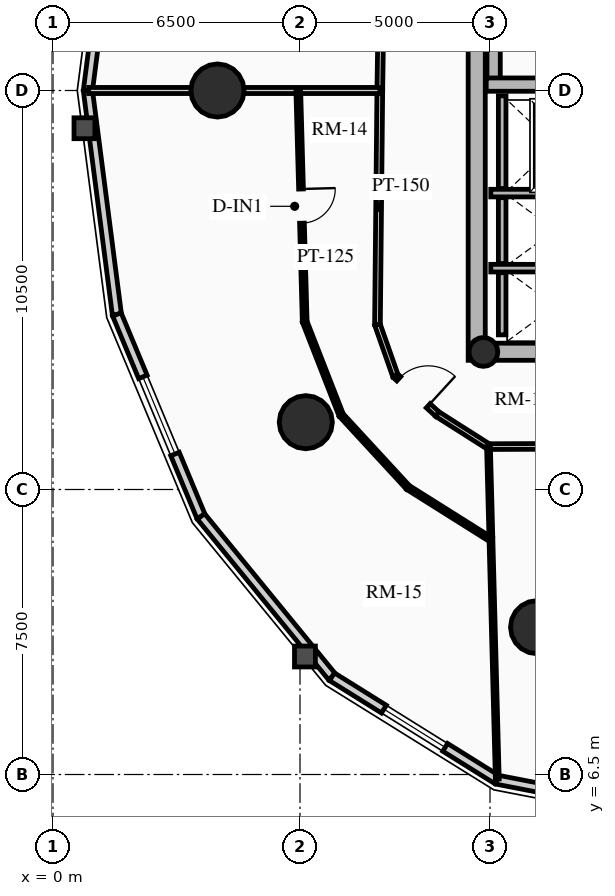
"""IFC4 building model, lengths in metres.
Left out: names, types, materials, properties, quantities, classifications, styles, units other than length and angle.
Written with IfcOpenShell. Run it as: python <this file> out.ifc"""

import sys

from ifc_helpers import new_model, si_unit, direction, frame, frame_2d, origin, origin_2d, place, context, subcontext, project, spatial, rectangle, circle, hollow_circle, extrude, source, transform, mapped, element, fill, save


model = new_model("IFC4")
c1 = context("Model", 3, precision=1e-05, world=origin(), true_north=direction((0.0, 1.0)))
c2 = subcontext(c1, "Body", "Model", "MODEL_VIEW")
j1 = project(units=[si_unit("LENGTHUNIT", "METRE"), si_unit("PLANEANGLEUNIT", "RADIAN")], contexts=[c1])
p1 = place(None, origin())
s1 = spatial("IfcSite", under=j1, at=p1, CompositionType="ELEMENT")
p2 = place(p1, origin())
s2 = spatial("IfcBuilding", under=s1, at=p2, CompositionType="ELEMENT")
p3 = place(p2, frame((0.0, 0.0, 125.44)))
s3 = spatial("IfcBuildingStorey", under=s2, at=p3, CompositionType="ELEMENT", Elevation=125.44)
p4 = place(p3, frame((11.15, 17.4, 0.0), z_axis=(0.0, 0.0, 1.0), x_axis=(0.0, 1.0, 0.0)))
e1 = element("IfcWall", 1, at=p4, inside=s3, PredefinedType="SHEAR", context=c2, shape_type="SweptSolid", body=[
    extrude(rectangle(XDim=14.2, YDim=0.45, at=frame_2d((7.1, 0.0))), origin(), (0.0, 0.0, 1.0), 3.72),
])
p5 = place(p3, frame((11.15, 17.625, 0.0), z_axis=(0.0, 0.0, 1.0), x_axis=(1.0, 0.0, 0.0)))
e2 = element("IfcWall", 2, at=p5, inside=s3, PredefinedType="SHEAR", context=c2, shape_type="SweptSolid", body=[
    extrude(rectangle(XDim=10.7, YDim=0.45, at=frame_2d((5.35, 0.0))), origin(), (0.0, 0.0, 1.0), 3.72),
])
m1 = source(origin(), c2, "Body", "SweptSolid", [
    extrude(rectangle(XDim=1.5, YDim=2.02, at=frame_2d((0.75, 1.01))), frame((0.0, 0.235, 0.0), z_axis=(0.0, -1.0, 0.0), x_axis=(1.0, 0.0, 0.0)), (0.0, 0.0, 1.0), 0.47),
])
p6 = place(p5, frame((5.45, 0.0, 0.0)))
e3 = element("IfcOpeningElement", 3, at=p6, cuts=e2, PredefinedType="OPENING", context=c2, shape_type="MappedRepresentation", body=[
    mapped(m1, transform((0.0, 0.0, 0.0), x_axis=(1.0, 0.0, 0.0), y_axis=(0.0, 1.0, 0.0), z_axis=(0.0, 0.0, 1.0), scale=1.0)),
])
p7 = place(p3, frame((11.595, 24.655, 0.0), z_axis=(0.0, 0.0, 1.0), x_axis=(0.0, 1.0, 0.0)))
e4 = element("IfcWall", 4, at=p7, inside=s3, PredefinedType="SHEAR", context=c2, shape_type="SweptSolid", body=[
    extrude(rectangle(XDim=6.72, YDim=0.35, at=frame_2d((3.36, 0.0))), origin(), (0.0, 0.0, 1.0), 3.72),
])
p8 = place(p3, frame((11.4, 24.655, 0.0), z_axis=(0.0, 0.0, 1.0), x_axis=(1.0, 0.0, 0.0)))
e5 = element("IfcWall", 5, at=p8, inside=s3, PredefinedType="SHEAR", context=c2, shape_type="SweptSolid", body=[
    extrude(rectangle(XDim=3.285, YDim=0.35, at=frame_2d((1.643, 0.0))), origin(), (0.0, 0.0, 1.0), 3.72),
])
p9 = place(p3, frame((11.325, 17.62, 0.0), z_axis=(0.0, 0.0, 1.0), x_axis=(1.0, 0.0, 0.0)))
e6 = element("IfcColumn", 6, at=p9, inside=s3, PredefinedType="COLUMN", context=c2, shape_type="SweptSolid", body=[
    extrude(hollow_circle(Radius=0.38, WallThickness=0.032, at=origin_2d()), origin(), (0.0, 0.0, 1.0), 3.72),
])
for number, where, z_axis, x_axis in (
    (7, (4.328, 24.5, 0.0), (0.0, 0.0, 1.0), (1.0, 0.0, 0.0)),
    (8, (6.653, 15.771, 0.0), (0.0, 0.0, 1.0), (1.0, 0.0, 0.0)),
    (9, (12.739, 10.377, 0.0), (0.0, 0.0, 1.0), (1.0, 0.0, 0.0)),
):
    element("IfcColumn", number, at=place(p3, frame(where, z_axis=z_axis, x_axis=x_axis)), inside=s3, PredefinedType="USERDEFINED", context=c2, shape_type="SweptSolid", body=[
        extrude(circle(Radius=0.7, at=origin_2d()), origin(), (0.0, 0.0, 1.0), 3.72),
    ])
p10 = place(p3, frame((0.919, 24.5, 0.0), z_axis=(0.0, 0.0, 1.0), x_axis=(0.128351991996, 0.991728675672, 0.0)))
e10 = element("IfcWall", 10, at=p10, inside=s3, PredefinedType="SOLIDWALL", context=c2, shape_type="SweptSolid", body=[
    extrude(rectangle(XDim=5.942, YDim=0.24, at=frame_2d((2.971, 0.0))), origin(), (0.0, 0.0, 1.0), 2.949),
])
m2 = source(origin(), c2, "Body", "SweptSolid", [
    extrude(rectangle(XDim=1.9, YDim=1.35, at=frame_2d((0.95, 0.675))), frame((0.0, 0.13, 0.0), z_axis=(0.0, -1.0, 0.0), x_axis=(1.0, 0.0, 0.0)), (0.0, 0.0, 1.0), 0.26),
])
p11 = place(p10, frame((2.021, 0.0, 0.65)))
e11 = element("IfcOpeningElement", 11, at=p11, cuts=e10, PredefinedType="OPENING", context=c2, shape_type="MappedRepresentation", body=[
    mapped(m2, transform((0.0, 0.0, 0.0), x_axis=(1.0, 0.0, 0.0), y_axis=(0.0, 1.0, 0.0), z_axis=(0.0, 0.0, 1.0), scale=1.0)),
])
p12 = place(p3, frame((1.682, 18.607, 0.0), z_axis=(0.0, 0.0, 1.0), x_axis=(-0.128351991996, 0.991728675672, 0.0)))
e12 = element("IfcWall", 12, at=p12, inside=s3, PredefinedType="SOLIDWALL", context=c2, shape_type="SweptSolid", body=[
    extrude(rectangle(XDim=5.942, YDim=0.24, at=frame_2d((2.971, 0.0))), origin(), (0.0, 0.0, 1.0), 2.949),
])
p13 = place(p3, frame((3.895, 13.291, 0.0), z_axis=(0.0, 0.0, 1.0), x_axis=(-0.384344417632, 0.923189779317, 0.0)))
e13 = element("IfcWall", 13, at=p13, inside=s3, PredefinedType="SOLIDWALL", context=c2, shape_type="SweptSolid", body=[
    extrude(rectangle(XDim=5.758, YDim=0.24, at=frame_2d((2.879, 0.0))), origin(), (0.0, 0.0, 1.0), 2.949),
])
m3 = source(origin(), c2, "Body", "SweptSolid", [
    extrude(rectangle(XDim=2.2, YDim=1.35, at=frame_2d((1.1, 0.675))), frame((0.0, 0.13, 0.0), z_axis=(0.0, -1.0, 0.0), x_axis=(1.0, 0.0, 0.0)), (0.0, 0.0, 1.0), 0.26),
])
p14 = place(p13, frame((1.779, 0.0, 0.65)))
e14 = element("IfcOpeningElement", 14, at=p14, cuts=e13, PredefinedType="OPENING", context=c2, shape_type="MappedRepresentation", body=[
    mapped(m3, transform((0.0, 0.0, 0.0), x_axis=(1.0, 0.0, 0.0), y_axis=(0.0, 1.0, 0.0), z_axis=(0.0, 0.0, 1.0), scale=1.0)),
])
p15 = place(p3, frame((7.342, 9.072, 0.0), z_axis=(0.0, 0.0, 1.0), x_axis=(-0.632700781152, 0.77439635945, 0.0)))
e15 = element("IfcWall", 15, at=p15, inside=s3, PredefinedType="SOLIDWALL", context=c2, shape_type="SweptSolid", body=[
    extrude(rectangle(XDim=5.448, YDim=0.24, at=frame_2d((2.724, 0.0))), origin(), (0.0, 0.0, 1.0), 2.949),
])
p16 = place(p3, frame((11.685, 6.363, 0.0), z_axis=(0.0, 0.0, 1.0), x_axis=(-0.848520380187, 0.529162701263, 0.0)))
e16 = element("IfcWall", 16, at=p16, inside=s3, PredefinedType="SOLIDWALL", context=c2, shape_type="SweptSolid", body=[
    extrude(rectangle(XDim=5.119, YDim=0.24, at=frame_2d((2.56, 0.0))), origin(), (0.0, 0.0, 1.0), 2.949),
])
p17 = place(p16, frame((1.609, 0.0, 0.65)))
e17 = element("IfcOpeningElement", 17, at=p17, cuts=e16, PredefinedType="OPENING", context=c2, shape_type="MappedRepresentation", body=[
    mapped(m2, transform((0.0, 0.0, 0.0), x_axis=(1.0, 0.0, 0.0), y_axis=(0.0, 1.0, 0.0), z_axis=(0.0, 0.0, 1.0), scale=1.0)),
])
p18 = place(p3, frame((16.5, 5.43, 0.0), z_axis=(0.0, 0.0, 1.0), x_axis=(-0.981723785992, 0.190311344954, 0.0)))
e18 = element("IfcWall", 18, at=p18, inside=s3, PredefinedType="SOLIDWALL", context=c2, shape_type="SweptSolid", body=[
    extrude(rectangle(XDim=4.904, YDim=0.24, at=frame_2d((2.452, 0.0))), origin(), (0.0, 0.0, 1.0), 2.949),
])
p19 = place(p18, frame((1.352, 0.0, 0.65)))
e19 = element("IfcOpeningElement", 19, at=p19, cuts=e18, PredefinedType="OPENING", context=c2, shape_type="MappedRepresentation", body=[
    mapped(m3, transform((0.0, 0.0, 0.0), x_axis=(1.0, 0.0, 0.0), y_axis=(0.0, 1.0, 0.0), z_axis=(0.0, 0.0, 1.0), scale=1.0)),
])
p20 = place(p3, frame((11.52, 21.8, 0.0), z_axis=(0.0, 0.0, 1.0), x_axis=(1.0, 0.0, 0.0)))
e20 = element("IfcWall", 20, at=p20, inside=s3, PredefinedType="SHEAR", context=c2, shape_type="SweptSolid", body=[
    extrude(rectangle(XDim=2.97, YDim=0.2, at=frame_2d((1.485, 0.0))), origin(), (0.0, 0.0, 1.0), 3.72),
])
p21 = place(p3, frame((11.82, 21.92, 0.0), z_axis=(0.0, 0.0, 1.0), x_axis=(0.0, 1.0, 0.0)))
e21 = element("IfcWall", 21, at=p21, inside=s3, PredefinedType="SHEAR", context=c2, shape_type="SweptSolid", body=[
    extrude(rectangle(XDim=2.44, YDim=0.2, at=frame_2d((1.22, 0.0))), origin(), (0.0, 0.0, 1.0), 3.72),
])
p22 = place(p3, frame((11.52, 19.825, 0.0), z_axis=(0.0, 0.0, 1.0), x_axis=(1.0, 0.0, 0.0)))
e22 = element("IfcWall", 22, at=p22, inside=s3, PredefinedType="SHEAR", context=c2, shape_type="SweptSolid", body=[
    extrude(rectangle(XDim=2.97, YDim=0.2, at=frame_2d((1.485, 0.0))), origin(), (0.0, 0.0, 1.0), 3.72),
])
p23 = place(p3, frame((11.82, 19.945, 0.0), z_axis=(0.0, 0.0, 1.0), x_axis=(0.0, 1.0, 0.0)))
e23 = element("IfcWall", 23, at=p23, inside=s3, PredefinedType="SHEAR", context=c2, shape_type="SweptSolid", body=[
    extrude(rectangle(XDim=1.735, YDim=0.2, at=frame_2d((0.867, 0.0))), origin(), (0.0, 0.0, 1.0), 3.72),
])
p24 = place(p3, frame((11.82, 18.07, 0.0), z_axis=(0.0, 0.0, 1.0), x_axis=(0.0, 1.0, 0.0)))
e24 = element("IfcWall", 24, at=p24, inside=s3, PredefinedType="SHEAR", context=c2, shape_type="SweptSolid", body=[
    extrude(rectangle(XDim=1.635, YDim=0.2, at=frame_2d((0.817, 0.0))), origin(), (0.0, 0.0, 1.0), 3.72),
])
p25 = place(p3, frame((8.693, 30.544, 0.0), z_axis=(0.0, 0.0, 1.0), x_axis=(-0.015307007986, -0.99988284089, 0.0)))
e25 = element("IfcWall", 25, at=p25, inside=s3, PredefinedType="PARTITIONING", context=c2, shape_type="SweptSolid", body=[
    extrude(rectangle(XDim=6.045, YDim=0.15, at=frame_2d((3.022, 0.0))), origin(), (0.0, 0.0, 1.0), 3.425),
])
p26 = place(p3, frame((8.6, 24.5, 0.0), z_axis=(0.0, 0.0, 1.0), x_axis=(-0.010023665349, -0.999949761805, 0.0)))
e26 = element("IfcWall", 26, at=p26, inside=s3, PredefinedType="PARTITIONING", context=c2, shape_type="SweptSolid", body=[
    extrude(rectangle(XDim=6.162, YDim=0.15, at=frame_2d((3.081, 0.0))), origin(), (0.0, 0.0, 1.0), 2.995),
])
p27 = place(p3, frame((8.538, 18.338, 0.0), z_axis=(0.0, 0.0, 1.0), x_axis=(0.331358150167, -0.94350504838, 0.0)))
e27 = element("IfcWall", 27, at=p27, inside=s3, PredefinedType="PARTITIONING", context=c2, shape_type="SweptSolid", body=[
    extrude(rectangle(XDim=1.424, YDim=0.15, at=frame_2d((0.712, 0.0))), origin(), (0.0, 0.0, 1.0), 2.995),
])
p28 = place(p3, frame((9.01, 16.994, 0.0), z_axis=(0.0, 0.0, 1.0), x_axis=(0.737701798986, -0.67512669609, 0.0)))
e28 = element("IfcWall", 28, at=p28, inside=s3, PredefinedType="PARTITIONING", context=c2, shape_type="SweptSolid", body=[
    extrude(rectangle(XDim=1.498, YDim=0.15, at=frame_2d((0.749, 0.0))), origin(), (0.0, 0.0, 1.0), 2.995),
])
m4 = source(origin(), c2, "Body", "SweptSolid", [
    extrude(rectangle(XDim=1.05, YDim=2.015, at=frame_2d((0.525, 1.007))), frame((0.0, 0.085, 0.0), z_axis=(0.0, -1.0, 0.0), x_axis=(1.0, 0.0, 0.0)), (0.0, 0.0, 1.0), 0.17),
])
p29 = place(p28, frame((0.12, 0.0, 0.0)))
e29 = element("IfcOpeningElement", 29, at=p29, cuts=e28, PredefinedType="OPENING", context=c2, shape_type="MappedRepresentation", body=[
    mapped(m4, transform((0.0, 0.0, 0.0), x_axis=(1.0, 0.0, 0.0), y_axis=(0.0, 1.0, 0.0), z_axis=(0.0, 0.0, 1.0), scale=1.0)),
])
p30 = place(p3, frame((10.115, 15.983, 0.0), z_axis=(0.0, 0.0, 1.0), x_axis=(0.843995849351, -0.536349705209, 0.0)))
e30 = element("IfcWall", 30, at=p30, inside=s3, PredefinedType="PARTITIONING", context=c2, shape_type="SweptSolid", body=[
    extrude(rectangle(XDim=1.593, YDim=0.15, at=frame_2d((0.796, 0.0))), origin(), (0.0, 0.0, 1.0), 2.995),
])
p31 = place(p3, frame((11.46, 15.129, 0.0), z_axis=(0.0, 0.0, 1.0), x_axis=(0.999993513287, 0.003601858435, 0.0)))
e31 = element("IfcWall", 31, at=p31, inside=s3, PredefinedType="PARTITIONING", context=c2, shape_type="SweptSolid", body=[
    extrude(rectangle(XDim=3.321, YDim=0.15, at=frame_2d((1.661, 0.0))), origin(), (0.0, 0.0, 1.0), 2.995),
])
p32 = place(p3, frame((8.6, 24.5, 0.0), z_axis=(0.0, 0.0, 1.0), x_axis=(-1.0, 0.0, 0.0)))
e32 = element("IfcWall", 32, at=p32, inside=s3, PredefinedType="PARTITIONING", context=c2, shape_type="SweptSolid", body=[
    extrude(rectangle(XDim=7.661, YDim=0.16, at=frame_2d((3.831, 0.0))), origin(), (0.0, 0.0, 1.0), 2.949),
])
p33 = place(p3, frame((11.46, 15.129, 0.0), z_axis=(0.0, 0.0, 1.0), x_axis=(0.026480592098, -0.999649327636, 0.0)))
e33 = element("IfcWall", 33, at=p33, inside=s3, PredefinedType="MOVABLE", context=c2, shape_type="SweptSolid", body=[
    extrude(rectangle(XDim=8.75, YDim=0.1, at=frame_2d((4.375, 0.0))), origin(), (0.0, 0.0, 1.0), 2.949),
])
p34 = place(p3, frame((6.455, 24.5, 0.0), z_axis=(0.0, 0.0, 1.0), x_axis=(0.027753708707, -0.999614791634, 0.0)))
e34 = element("IfcWall", 34, at=p34, inside=s3, PredefinedType="PARTITIONING", context=c2, shape_type="SweptSolid", body=[
    extrude(rectangle(XDim=6.087, YDim=0.125, at=frame_2d((3.044, 0.0))), origin(), (0.0, 0.0, 1.0), 2.995),
])
m5 = source(origin(), c2, "Body", "SweptSolid", [
    extrude(rectangle(XDim=0.9, YDim=2.005, at=frame_2d((0.45, 1.002))), frame((0.0, 0.073, 0.0), z_axis=(0.0, -1.0, 0.0), x_axis=(1.0, 0.0, 0.0)), (0.0, 0.0, 1.0), 0.145),
])
p35 = place(p34, frame((2.594, 0.0, 0.0)))
e35 = element("IfcOpeningElement", 35, at=p35, cuts=e34, PredefinedType="OPENING", context=c2, shape_type="MappedRepresentation", body=[
    mapped(m5, transform((0.0, 0.0, 0.0), x_axis=(1.0, 0.0, 0.0), y_axis=(0.0, 1.0, 0.0), z_axis=(0.0, 0.0, 1.0), scale=1.0)),
])
p36 = place(p3, frame((6.624, 18.415, 0.0), z_axis=(0.0, 0.0, 1.0), x_axis=(0.363854295337, -0.931455877519, 0.0)))
e36 = element("IfcWall", 36, at=p36, inside=s3, PredefinedType="PARTITIONING", context=c2, shape_type="SweptSolid", body=[
    extrude(rectangle(XDim=2.635, YDim=0.125, at=frame_2d((1.317, 0.0))), origin(), (0.0, 0.0, 1.0), 2.995),
])
p37 = place(p3, frame((7.583, 15.961, 0.0), z_axis=(0.0, 0.0, 1.0), x_axis=(0.677838563189, -0.735210774032, 0.0)))
e37 = element("IfcWall", 37, at=p37, inside=s3, PredefinedType="PARTITIONING", context=c2, shape_type="SweptSolid", body=[
    extrude(rectangle(XDim=2.596, YDim=0.125, at=frame_2d((1.298, 0.0))), origin(), (0.0, 0.0, 1.0), 3.425),
])
p38 = place(p3, frame((9.342, 14.052, 0.0), z_axis=(0.0, 0.0, 1.0), x_axis=(0.846526826244, -0.532346064557, 0.0)))
e38 = element("IfcWall", 38, at=p38, inside=s3, PredefinedType="PARTITIONING", context=c2, shape_type="SweptSolid", body=[
    extrude(rectangle(XDim=2.578, YDim=0.125, at=frame_2d((1.289, 0.0))), origin(), (0.0, 0.0, 1.0), 2.995),
])
m6 = source(origin(), c2, "Body", "SweptSolid", [
    extrude(rectangle(XDim=2.2, YDim=1.35, at=frame_2d((1.1, 0.675))), frame((0.0, 0.03, 0.0), z_axis=(0.0, -1.0, 0.0), x_axis=(1.0, 0.0, 0.0)), (0.0, 0.0, 1.0), 0.06),
])
p39 = place(p14, origin())
e39 = element("IfcWindow", 39, at=p39, inside=s3, PartitioningType="DOUBLE_PANEL_VERTICAL", PredefinedType="WINDOW", context=c2, shape_type="MappedRepresentation", body=[
    mapped(m6, transform((0.0, 0.0, 0.0), x_axis=(1.0, 0.0, 0.0), y_axis=(0.0, 1.0, 0.0), z_axis=(0.0, 0.0, 1.0), scale=1.0)),
])
fill(e14, e39)
m7 = source(origin(), c2, "Body", "SweptSolid", [
    extrude(rectangle(XDim=1.9, YDim=1.35, at=frame_2d((0.95, 0.675))), frame((0.0, 0.03, 0.0), z_axis=(0.0, -1.0, 0.0), x_axis=(1.0, 0.0, 0.0)), (0.0, 0.0, 1.0), 0.06),
])
p40 = place(p17, origin())
e40 = element("IfcWindow", 40, at=p40, inside=s3, PartitioningType="DOUBLE_PANEL_VERTICAL", PredefinedType="WINDOW", context=c2, shape_type="MappedRepresentation", body=[
    mapped(m7, transform((0.0, 0.0, 0.0), x_axis=(1.0, 0.0, 0.0), y_axis=(0.0, 1.0, 0.0), z_axis=(0.0, 0.0, 1.0), scale=1.0)),
])
fill(e17, e40)
m8 = source(origin(), c2, "Body", "SweptSolid", [
    extrude(rectangle(XDim=1.05, YDim=2.015, at=frame_2d((0.525, 1.007))), frame((0.0, 0.025, 0.0), z_axis=(0.0, -1.0, 0.0), x_axis=(1.0, 0.0, 0.0)), (0.0, 0.0, 1.0), 0.05),
])
p41 = place(p29, origin())
e41 = element("IfcDoor", 41, at=p41, inside=s3, OperationType="SINGLE_SWING_RIGHT", PredefinedType="DOOR", context=c2, shape_type="MappedRepresentation", body=[
    mapped(m8, transform((0.0, 0.0, 0.0), x_axis=(1.0, 0.0, 0.0), y_axis=(0.0, 1.0, 0.0), z_axis=(0.0, 0.0, 1.0), scale=1.0)),
])
fill(e29, e41)
m9 = source(origin(), c2, "Body", "SweptSolid", [
    extrude(rectangle(XDim=0.9, YDim=2.005, at=frame_2d((0.45, 1.002))), frame((0.0, 0.025, 0.0), z_axis=(0.0, -1.0, 0.0), x_axis=(1.0, 0.0, 0.0)), (0.0, 0.0, 1.0), 0.05),
])
p42 = place(p35, origin())
e42 = element("IfcDoor", 42, at=p42, inside=s3, OperationType="SINGLE_SWING_LEFT", PredefinedType="DOOR", context=c2, shape_type="MappedRepresentation", body=[
    mapped(m9, transform((0.0, 0.0, 0.0), x_axis=(1.0, 0.0, 0.0), y_axis=(0.0, 1.0, 0.0), z_axis=(0.0, 0.0, 1.0), scale=1.0)),
])
fill(e35, e42)
save(model, sys.argv[1])
